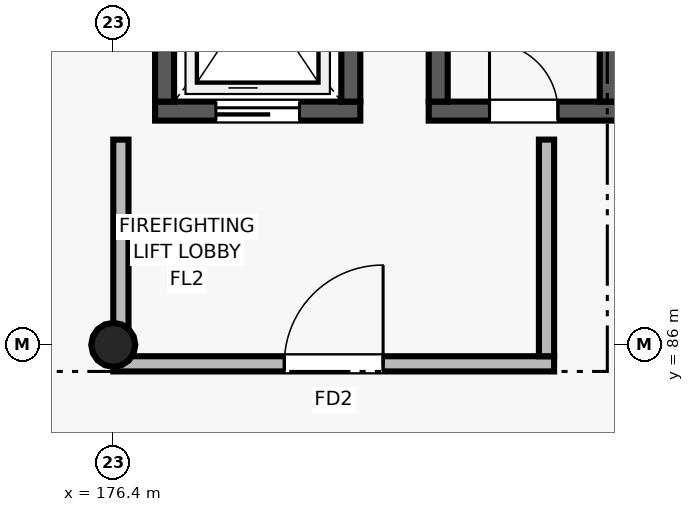
"""IFC4 building model, lengths in metres.
Left out: names, types, materials, properties, quantities, classifications, styles, units other than length and angle.
Written with IfcOpenShell. Run it as: python <this file> out.ifc"""

import sys

from ifc_helpers import new_model, si_unit, direction, frame, frame_2d, origin, origin_2d, place, context, subcontext, project, spatial, rectangle, circle, extrude, element, fill, save


model = new_model("IFC4")
c1 = context("Model", 3, precision=1e-05, world=origin(), true_north=direction((0.0, 1.0)))
c2 = subcontext(c1, "Body", "Model", "MODEL_VIEW")
j1 = project(units=[si_unit("LENGTHUNIT", "METRE"), si_unit("PLANEANGLEUNIT", "RADIAN")], contexts=[c1])
p1 = place(None, origin())
s1 = spatial("IfcSite", under=j1, at=p1, CompositionType="ELEMENT")
p2 = place(p1, origin())
s2 = spatial("IfcBuilding", under=s1, at=p2, CompositionType="ELEMENT")
p3 = place(p2, frame((0.0, 0.0, 13.2)))
s3 = spatial("IfcBuildingStorey", under=s2, at=p3, CompositionType="ELEMENT", Elevation=13.2)
p4 = place(p3, frame((176.4, 86.0, 0.0), z_axis=(0.0, 0.0, 1.0), x_axis=(1.0, 0.0, 0.0)))
e1 = element("IfcColumn", 1, at=p4, inside=s3, PredefinedType="COLUMN", context=c2, shape_type="SweptSolid", body=[
    extrude(circle(Radius=0.29, at=origin_2d()), origin(), (0.0, 0.0, 1.0), 4.2),
])
p5 = place(p3, frame((176.95, 89.075, 0.0), z_axis=(0.0, 0.0, 1.0), x_axis=(1.0, 0.0, 0.0)))
e2 = element("IfcWall", 2, at=p5, inside=s3, PredefinedType="SHEAR", context=c2, shape_type="SweptSolid", body=[
    extrude(rectangle(XDim=2.7, YDim=0.25, at=frame_2d((1.35, 0.0))), origin(), (0.0, 0.0, 1.0), 3.92),
])
p6 = place(p5, frame((0.8, 0.0, 0.0)))
e3 = element("IfcOpeningElement", 3, at=p6, cuts=e2, PredefinedType="OPENING", context=c2, shape_type="SweptSolid", body=[
    extrude(rectangle(XDim=1.1, YDim=2.15, at=frame_2d((0.55, 1.075))), frame((0.0, 0.135, 0.0), z_axis=(0.0, -1.0, 0.0), x_axis=(1.0, 0.0, 0.0)), (0.0, 0.0, 1.0), 0.27),
])
for number, where, z_axis, x_axis in (
    (4, (177.075, 89.2, 0.0), (0.0, 0.0, 1.0), (0.0, 1.0, 0.0)),
    (5, (179.525, 89.2, 0.0), (0.0, 0.0, 1.0), (0.0, 1.0, 0.0)),
):
    element("IfcWall", number, at=place(p3, frame(where, z_axis=z_axis, x_axis=x_axis)), inside=s3, PredefinedType="SHEAR", context=c2, shape_type="SweptSolid", body=[
        extrude(rectangle(XDim=2.9, YDim=0.25, at=frame_2d((1.45, 0.0))), origin(), (0.0, 0.0, 1.0), 3.92),
    ])
p7 = place(p3, frame((176.4, 85.75, 0.0), z_axis=(0.0, 0.0, 1.0), x_axis=(1.0, 0.0, 0.0)))
e6 = element("IfcWall", 6, at=p7, inside=s3, PredefinedType="SOLIDWALL", context=c2, shape_type="SweptSolid", body=[
    extrude(rectangle(XDim=5.8, YDim=0.2, at=frame_2d((2.9, 0.0))), origin(), (0.0, 0.0, 1.0), 3.92),
])
p8 = place(p7, frame((2.25, 0.0, 0.0)))
e7 = element("IfcOpeningElement", 7, at=p8, cuts=e6, PredefinedType="OPENING", context=c2, shape_type="SweptSolid", body=[
    extrude(rectangle(XDim=1.3, YDim=2.2, at=frame_2d((0.65, 1.1))), frame((0.0, 0.11, 0.0), z_axis=(0.0, -1.0, 0.0), x_axis=(1.0, 0.0, 0.0)), (0.0, 0.0, 1.0), 0.22),
])
p9 = place(p3, frame((176.5, 85.85, 0.0), z_axis=(0.0, 0.0, 1.0), x_axis=(0.0, 1.0, 0.0)))
e8 = element("IfcWall", 8, at=p9, inside=s3, PredefinedType="SOLIDWALL", context=c2, shape_type="SweptSolid", body=[
    extrude(rectangle(XDim=2.85, YDim=0.2, at=frame_2d((1.425, 0.0))), origin(), (0.0, 0.0, 1.0), 3.28),
])
p10 = place(p3, frame((182.1, 85.85, 0.0), z_axis=(0.0, 0.0, 1.0), x_axis=(0.0, 1.0, 0.0)))
e9 = element("IfcWall", 9, at=p10, inside=s3, PredefinedType="SOLIDWALL", context=c2, shape_type="SweptSolid", body=[
    extrude(rectangle(XDim=2.85, YDim=0.2, at=frame_2d((1.425, 0.0))), origin(), (0.0, 0.0, 1.0), 3.92),
])
p11 = place(p3, frame((180.55, 89.075, 0.0), z_axis=(0.0, 0.0, 1.0), x_axis=(1.0, 0.0, 0.0)))
e10 = element("IfcWall", 10, at=p11, inside=s3, PredefinedType="SHEAR", context=c2, shape_type="SweptSolid", body=[
    extrude(rectangle(XDim=2.5, YDim=0.25, at=frame_2d((1.25, 0.0))), origin(), (0.0, 0.0, 1.0), 3.92),
])
p12 = place(p11, frame((0.8, 0.0, 0.0)))
e11 = element("IfcOpeningElement", 11, at=p12, cuts=e10, PredefinedType="OPENING", context=c2, shape_type="SweptSolid", body=[
    extrude(rectangle(XDim=0.9, YDim=2.05, at=frame_2d((0.45, 1.025))), frame((0.0, 0.135, 0.0), z_axis=(0.0, -1.0, 0.0), x_axis=(1.0, 0.0, 0.0)), (0.0, 0.0, 1.0), 0.27),
])
for number, where, z_axis, x_axis in (
    (12, (180.675, 89.2, 0.0), (0.0, 0.0, 1.0), (0.0, 1.0, 0.0)),
    (13, (182.925, 89.2, 0.0), (0.0, 0.0, 1.0), (0.0, 1.0, 0.0)),
):
    element("IfcWall", number, at=place(p3, frame(where, z_axis=z_axis, x_axis=x_axis)), inside=s3, PredefinedType="SHEAR", context=c2, shape_type="SweptSolid", body=[
        extrude(rectangle(XDim=2.9, YDim=0.25, at=frame_2d((1.45, 0.0))), origin(), (0.0, 0.0, 1.0), 3.92),
    ])
p13 = place(p8, origin())
e14 = element("IfcDoor", 14, at=p13, inside=s3, OperationType="SINGLE_SWING_RIGHT", PredefinedType="DOOR", context=c2, shape_type="SweptSolid", body=[
    extrude(rectangle(XDim=1.3, YDim=2.2, at=frame_2d((0.65, 1.1))), frame((0.0, 0.025, 0.0), z_axis=(0.0, -1.0, 0.0), x_axis=(1.0, 0.0, 0.0)), (0.0, 0.0, 1.0), 0.05),
])
fill(e7, e14)
p14 = place(p12, origin())
e15 = element("IfcDoor", 15, at=p14, inside=s3, OperationType="SINGLE_SWING_LEFT", PredefinedType="DOOR", context=c2, shape_type="SweptSolid", body=[
    extrude(rectangle(XDim=0.9, YDim=2.05, at=frame_2d((0.45, 1.025))), frame((0.0, 0.025, 0.0), z_axis=(0.0, -1.0, 0.0), x_axis=(1.0, 0.0, 0.0)), (0.0, 0.0, 1.0), 0.05),
])
fill(e11, e15)
p15 = place(p6, origin())
e16 = element("IfcDoor", 16, at=p15, inside=s3, OperationType="SLIDING_TO_LEFT", PredefinedType="DOOR", context=c2, shape_type="SweptSolid", body=[
    extrude(rectangle(XDim=1.1, YDim=2.15, at=frame_2d((0.55, 1.075))), frame((0.0, 0.025, 0.0), z_axis=(0.0, -1.0, 0.0), x_axis=(1.0, 0.0, 0.0)), (0.0, 0.0, 1.0), 0.05),
])
fill(e3, e16)
save(model, sys.argv[1])
